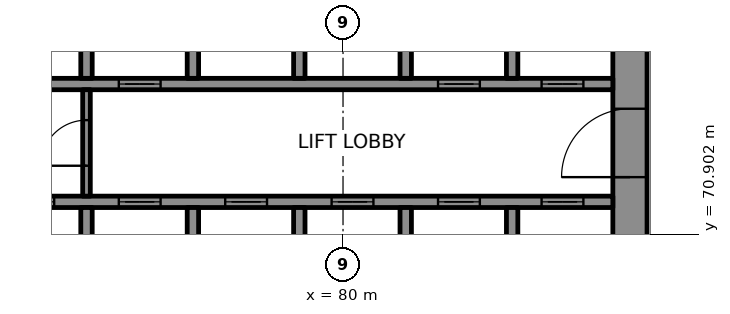
"""IFC4 building model, lengths in metres.
Left out: names, types, materials, properties, quantities, classifications, styles, units other than length and angle.
Written with IfcOpenShell. Run it as: python <this file> out.ifc"""

import sys

from ifc_helpers import new_model, si_unit, direction, frame, frame_2d, origin, place, context, subcontext, project, spatial, rectangle, extrude, element, fill, save


model = new_model("IFC4")
c1 = context("Model", 3, precision=1e-05, world=origin(), true_north=direction((0.0, 1.0)))
c2 = subcontext(c1, "Body", "Model", "MODEL_VIEW")
j1 = project(units=[si_unit("LENGTHUNIT", "METRE"), si_unit("PLANEANGLEUNIT", "RADIAN")], contexts=[c1])
p1 = place(None, origin())
s1 = spatial("IfcSite", under=j1, at=p1, CompositionType="ELEMENT")
p2 = place(p1, origin())
s2 = spatial("IfcBuilding", under=s1, at=p2, CompositionType="ELEMENT")
p3 = place(p2, frame((0.0, 0.0, 8.0)))
s3 = spatial("IfcBuildingStorey", under=s2, at=p3, CompositionType="ELEMENT", Elevation=8.0)
p4 = place(p3, frame((87.55, 66.9, 0.0), z_axis=(0.0, 0.0, 1.0), x_axis=(0.0, 1.0, 0.0)))
e1 = element("IfcWall", 1, at=p4, inside=s3, PredefinedType="SHEAR", context=c2, shape_type="SweptSolid", body=[
    extrude(rectangle(XDim=16.2, YDim=0.9, at=frame_2d((8.1, 0.0))), origin(), (0.0, 0.0, 1.0), 4.3),
])
p5 = place(p4, frame((5.5, 0.0, 0.0)))
e2 = element("IfcOpeningElement", 2, at=p5, cuts=e1, PredefinedType="OPENING", context=c2, shape_type="SweptSolid", body=[
    extrude(rectangle(XDim=1.8, YDim=2.1, at=frame_2d((0.9, 1.05))), frame((0.0, 0.46, 0.0), z_axis=(0.0, -1.0, 0.0), x_axis=(1.0, 0.0, 0.0)), (0.0, 0.0, 1.0), 0.92),
])
p6 = place(p4, frame((11.738, 0.0, 0.0)))
e3 = element("IfcOpeningElement", 3, at=p6, cuts=e1, PredefinedType="OPENING", context=c2, shape_type="SweptSolid", body=[
    extrude(rectangle(XDim=0.9, YDim=2.1, at=frame_2d((0.45, 1.05))), frame((0.0, 0.46, 0.0), z_axis=(0.0, -1.0, 0.0), x_axis=(1.0, 0.0, 0.0)), (0.0, 0.0, 1.0), 0.92),
])
p7 = place(p3, frame((70.3, 71.75, 0.0), z_axis=(0.0, 0.0, 1.0), x_axis=(1.0, 0.0, 0.0)))
e4 = element("IfcWall", 4, at=p7, inside=s3, PredefinedType="SHEAR", context=c2, shape_type="SweptSolid", body=[
    extrude(rectangle(XDim=16.8, YDim=0.3, at=frame_2d((8.4, 0.0))), origin(), (0.0, 0.0, 1.0), 4.3),
])
p8 = place(p7, frame((1.0, 0.0, 0.0)))
e5 = element("IfcOpeningElement", 5, at=p8, cuts=e4, PredefinedType="OPENING", context=c2, shape_type="SweptSolid", body=[
    extrude(rectangle(XDim=1.1, YDim=2.1, at=frame_2d((0.55, 1.05))), frame((0.0, 0.16, 0.0), z_axis=(0.0, -1.0, 0.0), x_axis=(1.0, 0.0, 0.0)), (0.0, 0.0, 1.0), 0.32),
])
p9 = place(p7, frame((3.8, 0.0, 0.0)))
e6 = element("IfcOpeningElement", 6, at=p9, cuts=e4, PredefinedType="OPENING", context=c2, shape_type="SweptSolid", body=[
    extrude(rectangle(XDim=1.1, YDim=2.1, at=frame_2d((0.55, 1.05))), frame((0.0, 0.16, 0.0), z_axis=(0.0, -1.0, 0.0), x_axis=(1.0, 0.0, 0.0)), (0.0, 0.0, 1.0), 0.32),
])
p10 = place(p7, frame((6.6, 0.0, 0.0)))
e7 = element("IfcOpeningElement", 7, at=p10, cuts=e4, PredefinedType="OPENING", context=c2, shape_type="SweptSolid", body=[
    extrude(rectangle(XDim=1.1, YDim=2.1, at=frame_2d((0.55, 1.05))), frame((0.0, 0.16, 0.0), z_axis=(0.0, -1.0, 0.0), x_axis=(1.0, 0.0, 0.0)), (0.0, 0.0, 1.0), 0.32),
])
p11 = place(p7, frame((9.4, 0.0, 0.0)))
e8 = element("IfcOpeningElement", 8, at=p11, cuts=e4, PredefinedType="OPENING", context=c2, shape_type="SweptSolid", body=[
    extrude(rectangle(XDim=1.1, YDim=2.1, at=frame_2d((0.55, 1.05))), frame((0.0, 0.16, 0.0), z_axis=(0.0, -1.0, 0.0), x_axis=(1.0, 0.0, 0.0)), (0.0, 0.0, 1.0), 0.32),
])
p12 = place(p7, frame((12.2, 0.0, 0.0)))
e9 = element("IfcOpeningElement", 9, at=p12, cuts=e4, PredefinedType="OPENING", context=c2, shape_type="SweptSolid", body=[
    extrude(rectangle(XDim=1.1, YDim=2.1, at=frame_2d((0.55, 1.05))), frame((0.0, 0.16, 0.0), z_axis=(0.0, -1.0, 0.0), x_axis=(1.0, 0.0, 0.0)), (0.0, 0.0, 1.0), 0.32),
])
p13 = place(p7, frame((14.925, 0.0, 0.0)))
e10 = element("IfcOpeningElement", 10, at=p13, cuts=e4, PredefinedType="OPENING", context=c2, shape_type="SweptSolid", body=[
    extrude(rectangle(XDim=1.1, YDim=2.1, at=frame_2d((0.55, 1.05))), frame((0.0, 0.16, 0.0), z_axis=(0.0, -1.0, 0.0), x_axis=(1.0, 0.0, 0.0)), (0.0, 0.0, 1.0), 0.32),
])
p14 = place(p3, frame((70.3, 74.85, 0.0), z_axis=(0.0, 0.0, 1.0), x_axis=(1.0, 0.0, 0.0)))
e11 = element("IfcWall", 11, at=p14, inside=s3, PredefinedType="SHEAR", context=c2, shape_type="SweptSolid", body=[
    extrude(rectangle(XDim=16.8, YDim=0.3, at=frame_2d((8.4, 0.0))), origin(), (0.0, 0.0, 1.0), 4.3),
])
p15 = place(p14, frame((3.8, 0.0, 0.0)))
e12 = element("IfcOpeningElement", 12, at=p15, cuts=e11, PredefinedType="OPENING", context=c2, shape_type="SweptSolid", body=[
    extrude(rectangle(XDim=1.1, YDim=2.1, at=frame_2d((0.55, 1.05))), frame((0.0, 0.16, 0.0), z_axis=(0.0, -1.0, 0.0), x_axis=(1.0, 0.0, 0.0)), (0.0, 0.0, 1.0), 0.32),
])
p16 = place(p14, frame((12.2, 0.0, 0.0)))
e13 = element("IfcOpeningElement", 13, at=p16, cuts=e11, PredefinedType="OPENING", context=c2, shape_type="SweptSolid", body=[
    extrude(rectangle(XDim=1.1, YDim=2.1, at=frame_2d((0.55, 1.05))), frame((0.0, 0.16, 0.0), z_axis=(0.0, -1.0, 0.0), x_axis=(1.0, 0.0, 0.0)), (0.0, 0.0, 1.0), 0.32),
])
p17 = place(p14, frame((14.925, 0.0, 0.0)))
e14 = element("IfcOpeningElement", 14, at=p17, cuts=e11, PredefinedType="OPENING", context=c2, shape_type="SweptSolid", body=[
    extrude(rectangle(XDim=1.1, YDim=2.1, at=frame_2d((0.55, 1.05))), frame((0.0, 0.16, 0.0), z_axis=(0.0, -1.0, 0.0), x_axis=(1.0, 0.0, 0.0)), (0.0, 0.0, 1.0), 0.32),
])
for number, where, z_axis, x_axis in (
    (15, (73.25, 69.0, 0.0), (0.0, 0.0, 1.0), (0.0, 1.0, 0.0)),
    (16, (73.25, 75.0, 0.0), (0.0, 0.0, 1.0), (0.0, 1.0, 0.0)),
    (17, (76.05, 69.0, 0.0), (0.0, 0.0, 1.0), (0.0, 1.0, 0.0)),
    (18, (76.05, 75.0, 0.0), (0.0, 0.0, 1.0), (0.0, 1.0, 0.0)),
    (19, (78.85, 69.0, 0.0), (0.0, 0.0, 1.0), (0.0, 1.0, 0.0)),
    (20, (78.85, 75.0, 0.0), (0.0, 0.0, 1.0), (0.0, 1.0, 0.0)),
    (21, (81.65, 69.0, 0.0), (0.0, 0.0, 1.0), (0.0, 1.0, 0.0)),
    (22, (81.65, 75.0, 0.0), (0.0, 0.0, 1.0), (0.0, 1.0, 0.0)),
    (23, (84.45, 69.0, 0.0), (0.0, 0.0, 1.0), (0.0, 1.0, 0.0)),
    (24, (84.45, 75.0, 0.0), (0.0, 0.0, 1.0), (0.0, 1.0, 0.0)),
):
    element("IfcWall", number, at=place(p3, frame(where, z_axis=z_axis, x_axis=x_axis)), inside=s3, PredefinedType="SHEAR", context=c2, shape_type="SweptSolid", body=[
        extrude(rectangle(XDim=2.6, YDim=0.3, at=frame_2d((1.3, 0.0))), origin(), (0.0, 0.0, 1.0), 4.3),
    ])
p18 = place(p3, frame((73.25, 71.9, 0.0), z_axis=(0.0, 0.0, 1.0), x_axis=(0.0, 1.0, 0.0)))
e25 = element("IfcWall", 25, at=p18, inside=s3, PredefinedType="PARTITIONING", context=c2, shape_type="SweptSolid", body=[
    extrude(rectangle(XDim=2.8, YDim=0.2, at=frame_2d((1.4, 0.0))), origin(), (0.0, 0.0, 1.0), 4.3),
])
p19 = place(p18, frame((0.8, 0.0, 0.0)))
e26 = element("IfcOpeningElement", 26, at=p19, cuts=e25, PredefinedType="OPENING", context=c2, shape_type="SweptSolid", body=[
    extrude(rectangle(XDim=1.2, YDim=2.1, at=frame_2d((0.6, 1.05))), frame((0.0, 0.11, 0.0), z_axis=(0.0, -1.0, 0.0), x_axis=(1.0, 0.0, 0.0)), (0.0, 0.0, 1.0), 0.22),
])
p20 = place(p3, frame((107.106, 62.36, 0.0), z_axis=(0.0, 0.0, 1.0), x_axis=(-0.49999992739, 0.866025445706, 0.0)))
e27 = element("IfcWall", 27, at=p20, inside=s3, PredefinedType="SOLIDWALL", context=c2, shape_type="SweptSolid", body=[
    extrude(rectangle(XDim=54.0, YDim=0.4, at=frame_2d((27.0, 0.0))), origin(), (0.0, 0.0, 1.0), 4.24),
])
p21 = place(p3, frame((112.496, 65.725, 0.0), z_axis=(0.0, 0.0, 1.0), x_axis=(-0.499998673217, 0.866026169802, 0.0)))
e28 = element("IfcWall", 28, at=p21, inside=s3, PredefinedType="PARTITIONING", context=c2, shape_type="SweptSolid", body=[
    extrude(rectangle(XDim=53.48, YDim=0.2, at=frame_2d((26.74, 0.0))), origin(), (0.0, 0.0, 1.0), 4.24),
])
p22 = place(p21, frame((13.08, 0.0, 0.0)))
e29 = element("IfcOpeningElement", 29, at=p22, cuts=e28, PredefinedType="OPENING", context=c2, shape_type="SweptSolid", body=[
    extrude(rectangle(XDim=1.0, YDim=2.1, at=frame_2d((0.5, 1.05))), frame((0.0, 0.11, 0.0), z_axis=(0.0, -1.0, 0.0), x_axis=(1.0, 0.0, 0.0)), (0.0, 0.0, 1.0), 0.22),
])
p23 = place(p21, frame((25.88, 0.0, 0.0)))
e30 = element("IfcOpeningElement", 30, at=p23, cuts=e28, PredefinedType="OPENING", context=c2, shape_type="SweptSolid", body=[
    extrude(rectangle(XDim=1.8, YDim=2.1, at=frame_2d((0.9, 1.05))), frame((0.0, 0.11, 0.0), z_axis=(0.0, -1.0, 0.0), x_axis=(1.0, 0.0, 0.0)), (0.0, 0.0, 1.0), 0.22),
])
p24 = place(p21, frame((50.58, 0.0, 0.0)))
e31 = element("IfcOpeningElement", 31, at=p24, cuts=e28, PredefinedType="OPENING", context=c2, shape_type="SweptSolid", body=[
    extrude(rectangle(XDim=1.0, YDim=2.1, at=frame_2d((0.5, 1.05))), frame((0.0, 0.11, 0.0), z_axis=(0.0, -1.0, 0.0), x_axis=(1.0, 0.0, 0.0)), (0.0, 0.0, 1.0), 0.22),
])
p25 = place(p21, frame((44.28, 0.0, 0.0)))
e32 = element("IfcOpeningElement", 32, at=p25, cuts=e28, PredefinedType="OPENING", context=c2, shape_type="SweptSolid", body=[
    extrude(rectangle(XDim=1.0, YDim=2.1, at=frame_2d((0.5, 1.05))), frame((0.0, 0.11, 0.0), z_axis=(0.0, -1.0, 0.0), x_axis=(1.0, 0.0, 0.0)), (0.0, 0.0, 1.0), 0.22),
])
p26 = place(p8, origin())
e33 = element("IfcDoor", 33, at=p26, inside=s3, OperationType="DOUBLE_DOOR_SLIDING", PredefinedType="DOOR", context=c2, shape_type="SweptSolid", body=[
    extrude(rectangle(XDim=1.1, YDim=2.1, at=frame_2d((0.55, 1.05))), frame((0.0, 0.025, 0.0), z_axis=(0.0, -1.0, 0.0), x_axis=(1.0, 0.0, 0.0)), (0.0, 0.0, 1.0), 0.05),
])
fill(e5, e33)
p27 = place(p9, origin())
e34 = element("IfcDoor", 34, at=p27, inside=s3, OperationType="DOUBLE_DOOR_SLIDING", PredefinedType="DOOR", context=c2, shape_type="SweptSolid", body=[
    extrude(rectangle(XDim=1.1, YDim=2.1, at=frame_2d((0.55, 1.05))), frame((0.0, 0.025, 0.0), z_axis=(0.0, -1.0, 0.0), x_axis=(1.0, 0.0, 0.0)), (0.0, 0.0, 1.0), 0.05),
])
fill(e6, e34)
p28 = place(p10, origin())
e35 = element("IfcDoor", 35, at=p28, inside=s3, OperationType="DOUBLE_DOOR_SLIDING", PredefinedType="DOOR", context=c2, shape_type="SweptSolid", body=[
    extrude(rectangle(XDim=1.1, YDim=2.1, at=frame_2d((0.55, 1.05))), frame((0.0, 0.025, 0.0), z_axis=(0.0, -1.0, 0.0), x_axis=(1.0, 0.0, 0.0)), (0.0, 0.0, 1.0), 0.05),
])
fill(e7, e35)
p29 = place(p11, origin())
e36 = element("IfcDoor", 36, at=p29, inside=s3, OperationType="DOUBLE_DOOR_SLIDING", PredefinedType="DOOR", context=c2, shape_type="SweptSolid", body=[
    extrude(rectangle(XDim=1.1, YDim=2.1, at=frame_2d((0.55, 1.05))), frame((0.0, 0.025, 0.0), z_axis=(0.0, -1.0, 0.0), x_axis=(1.0, 0.0, 0.0)), (0.0, 0.0, 1.0), 0.05),
])
fill(e8, e36)
p30 = place(p12, origin())
e37 = element("IfcDoor", 37, at=p30, inside=s3, OperationType="DOUBLE_DOOR_SLIDING", PredefinedType="DOOR", context=c2, shape_type="SweptSolid", body=[
    extrude(rectangle(XDim=1.1, YDim=2.1, at=frame_2d((0.55, 1.05))), frame((0.0, 0.025, 0.0), z_axis=(0.0, -1.0, 0.0), x_axis=(1.0, 0.0, 0.0)), (0.0, 0.0, 1.0), 0.05),
])
fill(e9, e37)
p31 = place(p13, origin())
e38 = element("IfcDoor", 38, at=p31, inside=s3, OperationType="DOUBLE_DOOR_SLIDING", PredefinedType="DOOR", context=c2, shape_type="SweptSolid", body=[
    extrude(rectangle(XDim=1.1, YDim=2.1, at=frame_2d((0.55, 1.05))), frame((0.0, 0.025, 0.0), z_axis=(0.0, -1.0, 0.0), x_axis=(1.0, 0.0, 0.0)), (0.0, 0.0, 1.0), 0.05),
])
fill(e10, e38)
p32 = place(p15, origin())
e39 = element("IfcDoor", 39, at=p32, inside=s3, OperationType="DOUBLE_DOOR_SLIDING", PredefinedType="DOOR", context=c2, shape_type="SweptSolid", body=[
    extrude(rectangle(XDim=1.1, YDim=2.1, at=frame_2d((0.55, 1.05))), frame((0.0, 0.025, 0.0), z_axis=(0.0, -1.0, 0.0), x_axis=(1.0, 0.0, 0.0)), (0.0, 0.0, 1.0), 0.05),
])
fill(e12, e39)
p33 = place(p16, origin())
e40 = element("IfcDoor", 40, at=p33, inside=s3, OperationType="DOUBLE_DOOR_SLIDING", PredefinedType="DOOR", context=c2, shape_type="SweptSolid", body=[
    extrude(rectangle(XDim=1.1, YDim=2.1, at=frame_2d((0.55, 1.05))), frame((0.0, 0.025, 0.0), z_axis=(0.0, -1.0, 0.0), x_axis=(1.0, 0.0, 0.0)), (0.0, 0.0, 1.0), 0.05),
])
fill(e13, e40)
p34 = place(p17, origin())
e41 = element("IfcDoor", 41, at=p34, inside=s3, OperationType="DOUBLE_DOOR_SLIDING", PredefinedType="DOOR", context=c2, shape_type="SweptSolid", body=[
    extrude(rectangle(XDim=1.1, YDim=2.1, at=frame_2d((0.55, 1.05))), frame((0.0, 0.025, 0.0), z_axis=(0.0, -1.0, 0.0), x_axis=(1.0, 0.0, 0.0)), (0.0, 0.0, 1.0), 0.05),
])
fill(e14, e41)
p35 = place(p19, origin())
e42 = element("IfcDoor", 42, at=p35, inside=s3, OperationType="SINGLE_SWING_LEFT", PredefinedType="DOOR", context=c2, shape_type="SweptSolid", body=[
    extrude(rectangle(XDim=1.2, YDim=2.1, at=frame_2d((0.6, 1.05))), frame((0.0, 0.025, 0.0), z_axis=(0.0, -1.0, 0.0), x_axis=(1.0, 0.0, 0.0)), (0.0, 0.0, 1.0), 0.05),
])
fill(e26, e42)
p36 = place(p5, origin())
e43 = element("IfcDoor", 43, at=p36, inside=s3, OperationType="SINGLE_SWING_RIGHT", PredefinedType="DOOR", context=c2, shape_type="SweptSolid", body=[
    extrude(rectangle(XDim=1.8, YDim=2.1, at=frame_2d((0.9, 1.05))), frame((0.0, 0.17, 0.0), z_axis=(0.0, -1.0, 0.0), x_axis=(1.0, 0.0, 0.0)), (0.0, 0.0, 1.0), 0.34),
])
fill(e2, e43)
save(model, sys.argv[1])
